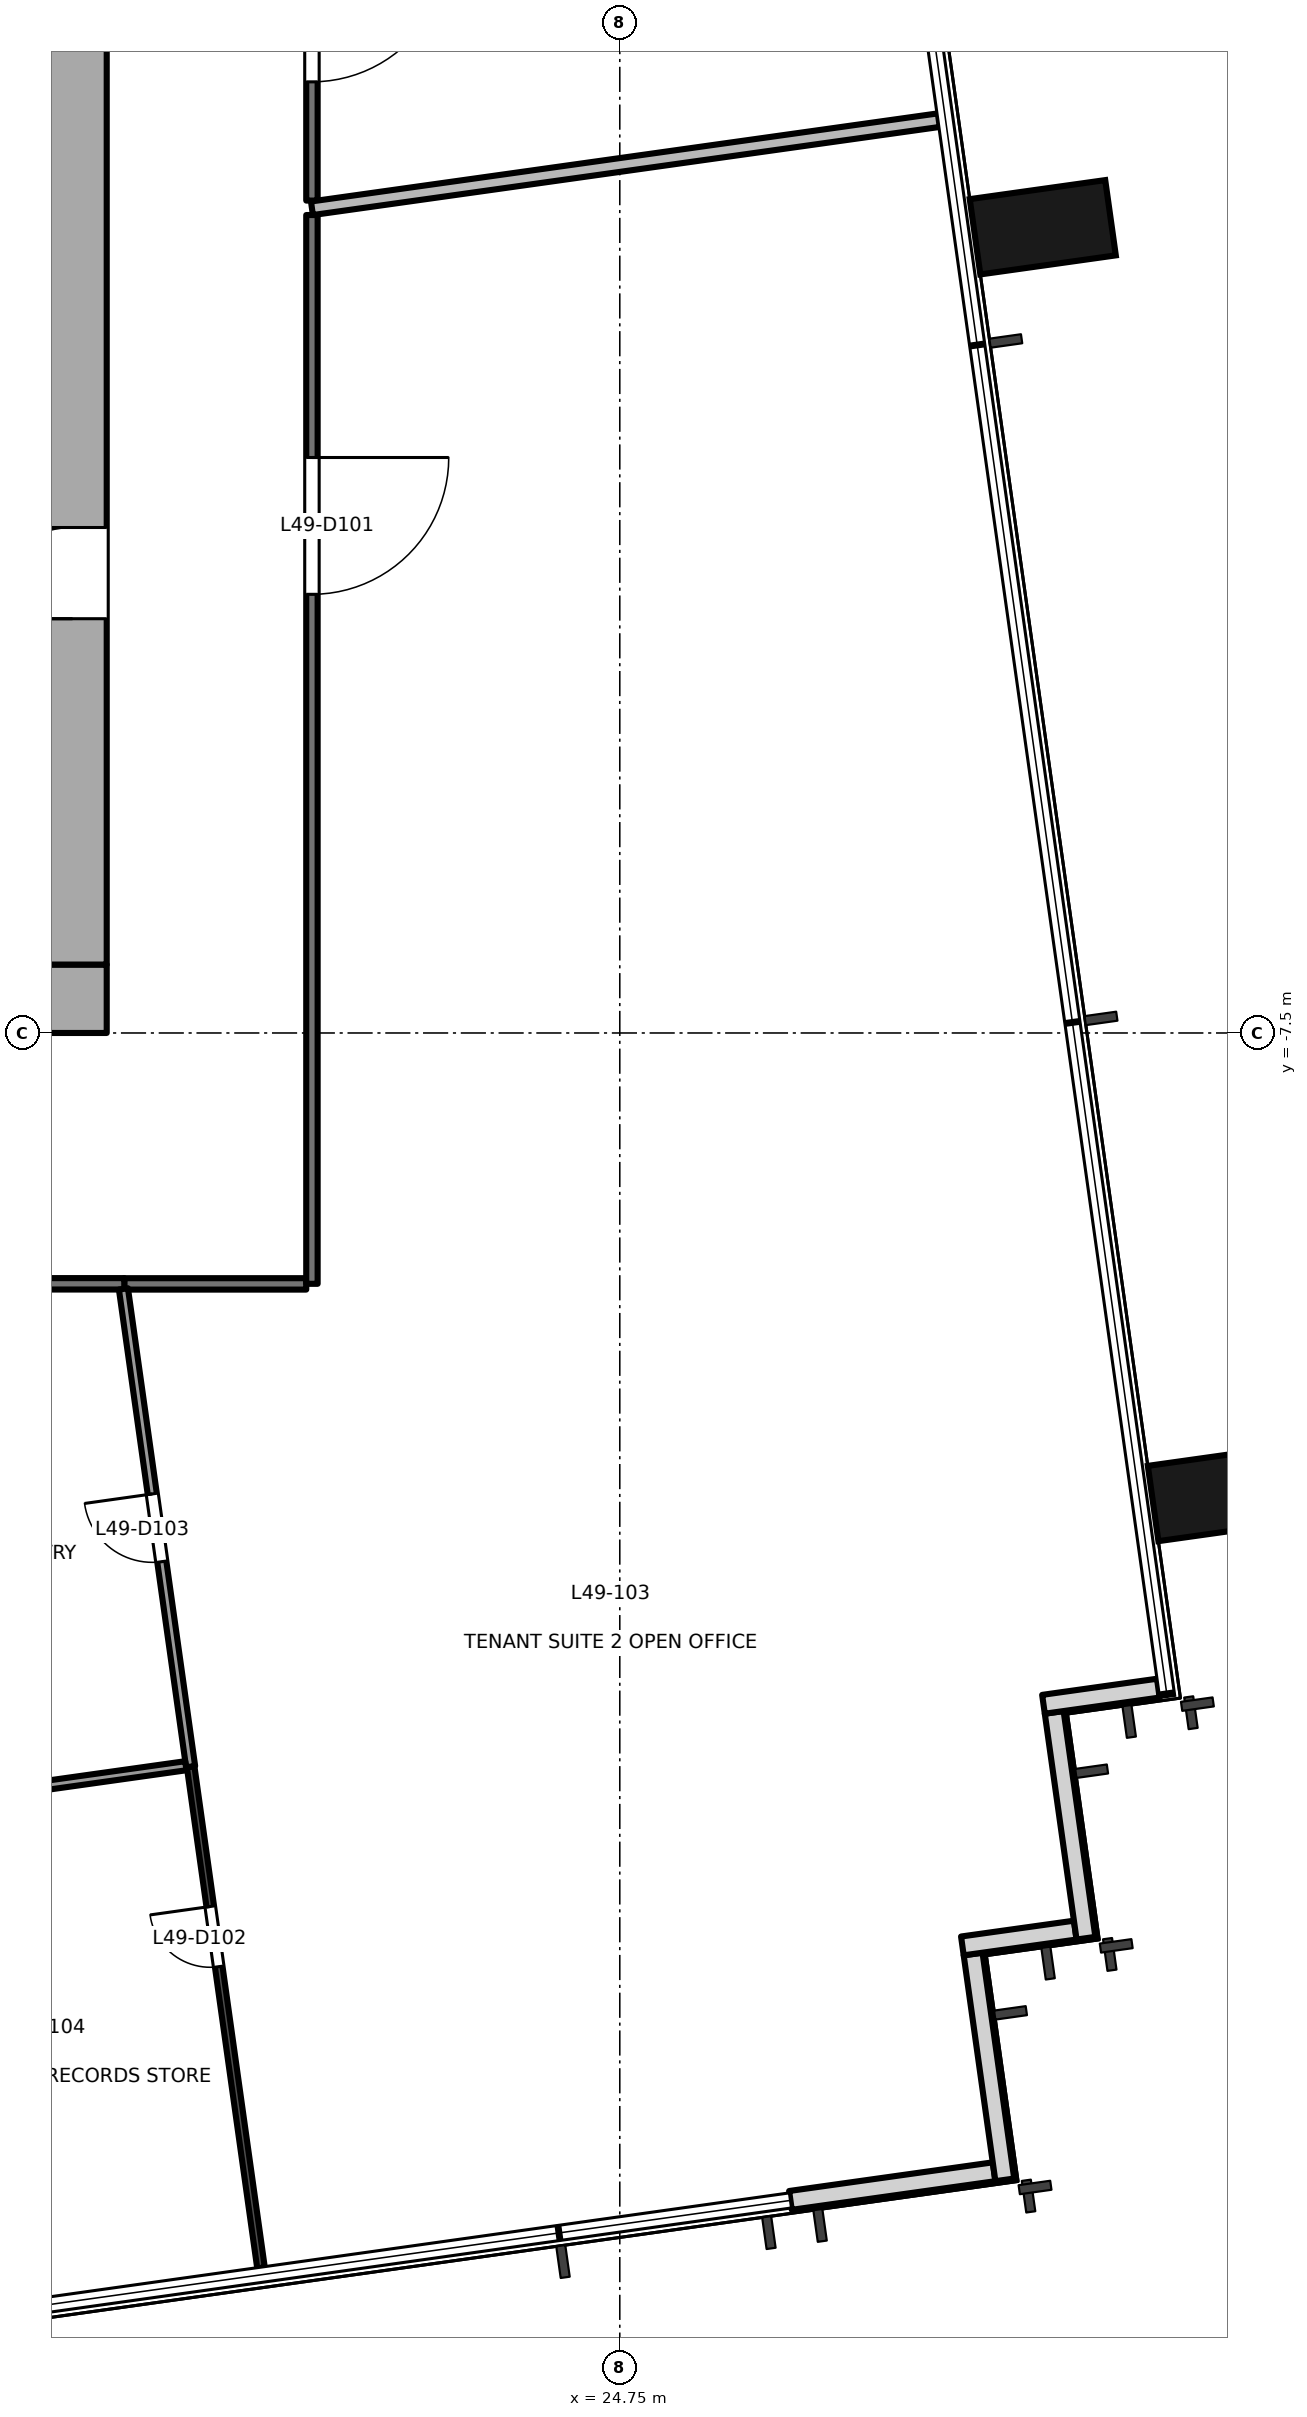
"""IFC4 building model, lengths in metres.
Left out: names, types, materials, properties, quantities, classifications, styles, units other than length and angle.
Written with IfcOpenShell. Run it as: python <this file> out.ifc"""

import sys

from ifc_helpers import new_model, si_unit, direction, frame, frame_2d, origin, origin_2d, place, context, subcontext, project, spatial, rectangle, extrude, element, fill, save


model = new_model("IFC4")
c1 = context("Model", 3, precision=1e-05, world=origin(), true_north=direction((0.0, 1.0)))
c2 = subcontext(c1, "Body", "Model", "MODEL_VIEW")
j1 = project(units=[si_unit("LENGTHUNIT", "METRE"), si_unit("PLANEANGLEUNIT", "RADIAN")], contexts=[c1])
p1 = place(None, origin())
s1 = spatial("IfcSite", under=j1, at=p1, CompositionType="ELEMENT")
p2 = place(p1, origin())
s2 = spatial("IfcBuilding", under=s1, at=p2, CompositionType="ELEMENT")
p3 = place(p2, frame((0.0, 0.0, 217.4)))
s3 = spatial("IfcBuildingStorey", under=s2, at=p3, CompositionType="ELEMENT", Elevation=217.4)
for number, where, z_axis, x_axis in (
    (1, (32.658, -13.565, -0.2), (0.0, 0.0, 1.0), (-0.139, 0.99, 0.0)),
    (2, (30.315, 3.1, -0.2), (0.0, 0.0, 1.0), (-0.139, 0.99, 0.0)),
):
    element("IfcColumn", number, at=place(p3, frame(where, z_axis=z_axis, x_axis=x_axis)), inside=s3, PredefinedType="COLUMN", context=c2, shape_type="SweptSolid", body=[
        extrude(rectangle(XDim=1.0, YDim=1.8, at=origin_2d()), origin(), (0.0, 0.0, 1.0), 3.9),
    ])
p4 = place(p3, frame((26.995, -22.859, 0.0), z_axis=(0.0, 0.0, 1.0), x_axis=(0.99024510326, 0.139336411139, 0.0)))
e3 = element("IfcWall", 3, at=p4, inside=s3, PredefinedType="SOLIDWALL", context=c2, shape_type="SweptSolid", body=[
    extrude(rectangle(XDim=2.705, YDim=0.25, at=frame_2d((1.353, 0.0))), origin(), (0.0, 0.0, 1.0), 3.7),
])
p5 = place(p3, frame((29.815, -22.588, 0.0), z_axis=(0.0, 0.0, 1.0), x_axis=(-0.138983028379, 0.9902947631, 0.0)))
e4 = element("IfcWall", 4, at=p5, inside=s3, PredefinedType="SOLIDWALL", context=c2, shape_type="SweptSolid", body=[
    extrude(rectangle(XDim=3.0, YDim=0.25, at=frame_2d((1.5, 0.0))), origin(), (0.0, 0.0, 1.0), 3.7),
])
p6 = place(p3, frame((29.257, -19.51, 0.0), z_axis=(0.0, 0.0, 1.0), x_axis=(0.990330117064, 0.138730887823, 0.0)))
e5 = element("IfcWall", 5, at=p6, inside=s3, PredefinedType="SOLIDWALL", context=c2, shape_type="SweptSolid", body=[
    extrude(rectangle(XDim=1.499, YDim=0.25, at=frame_2d((0.75, 0.0))), origin(), (0.0, 0.0, 1.0), 3.7),
])
p7 = place(p3, frame((30.883, -19.409, 0.0), z_axis=(0.0, 0.0, 1.0), x_axis=(-0.139324658755, 0.990246756855, 0.0)))
e6 = element("IfcWall", 6, at=p7, inside=s3, PredefinedType="SOLIDWALL", context=c2, shape_type="SweptSolid", body=[
    extrude(rectangle(XDim=3.0, YDim=0.25, at=frame_2d((1.5, 0.0))), origin(), (0.0, 0.0, 1.0), 3.7),
])
p8 = place(p3, frame((30.324, -16.332, 0.0), z_axis=(0.0, 0.0, 1.0), x_axis=(0.990238641016, 0.139382329723, 0.0)))
e7 = element("IfcWall", 7, at=p8, inside=s3, PredefinedType="SOLIDWALL", context=c2, shape_type="SweptSolid", body=[
    extrude(rectangle(XDim=1.526, YDim=0.25, at=frame_2d((0.763, 0.0))), origin(), (0.0, 0.0, 1.0), 3.7),
])
p9 = place(p3, frame((-18.0, -7.05, -0.2), z_axis=(0.0, 0.0, 1.0), x_axis=(1.0, 0.0, 0.0)))
e8 = element("IfcWall", 8, at=p9, inside=s3, PredefinedType="SHEAR", context=c2, shape_type="SweptSolid", body=[
    extrude(rectangle(XDim=36.0, YDim=0.9, at=frame_2d((18.0, 0.0))), origin(), (0.0, 0.0, 1.0), 3.9),
])
p10 = place(p9, frame((4.9, 0.0, 0.2)))
e9 = element("IfcOpeningElement", 9, at=p10, cuts=e8, PredefinedType="OPENING", context=c2, shape_type="SweptSolid", body=[
    extrude(rectangle(XDim=1.8, YDim=2.1, at=frame_2d((0.9, 1.05))), frame((0.0, 0.46, 0.0), z_axis=(0.0, -1.0, 0.0), x_axis=(1.0, 0.0, 0.0)), (0.0, 0.0, 1.0), 0.921),
])
p11 = place(p9, frame((16.8, 0.0, 0.2)))
e10 = element("IfcOpeningElement", 10, at=p11, cuts=e8, PredefinedType="OPENING", context=c2, shape_type="SweptSolid", body=[
    extrude(rectangle(XDim=2.4, YDim=2.1, at=frame_2d((1.2, 1.05))), frame((0.0, 0.46, 0.0), z_axis=(0.0, -1.0, 0.0), x_axis=(1.0, 0.0, 0.0)), (0.0, 0.0, 1.0), 0.921),
])
p12 = place(p9, frame((26.1, 0.0, 0.2)))
e11 = element("IfcOpeningElement", 11, at=p12, cuts=e8, PredefinedType="OPENING", context=c2, shape_type="SweptSolid", body=[
    extrude(rectangle(XDim=2.4, YDim=2.1, at=frame_2d((1.2, 1.05))), frame((0.0, 0.46, 0.0), z_axis=(0.0, -1.0, 0.0), x_axis=(1.0, 0.0, 0.0)), (0.0, 0.0, 1.0), 0.921),
])
p13 = place(p3, frame((17.55, -6.6, -0.2), z_axis=(0.0, 0.0, 1.0), x_axis=(0.0, 1.0, 0.0)))
e12 = element("IfcWall", 12, at=p13, inside=s3, PredefinedType="SHEAR", context=c2, shape_type="SweptSolid", body=[
    extrude(rectangle(XDim=13.2, YDim=0.9, at=frame_2d((6.6, 0.0))), origin(), (0.0, 0.0, 1.0), 3.9),
])
p14 = place(p13, frame((4.55, 0.0, 0.2)))
e13 = element("IfcOpeningElement", 13, at=p14, cuts=e12, PredefinedType="OPENING", context=c2, shape_type="SweptSolid", body=[
    extrude(rectangle(XDim=1.2, YDim=2.1, at=frame_2d((0.6, 1.05))), frame((0.0, 0.46, 0.0), z_axis=(0.0, -1.0, 0.0), x_axis=(1.0, 0.0, 0.0)), (0.0, 0.0, 1.0), 0.921),
])
p15 = place(p3, frame((20.625, -10.801, 0.0), z_axis=(0.0, 0.0, 1.0), x_axis=(-1.0, 0.0, 0.0)))
e14 = element("IfcWall", 14, at=p15, inside=s3, PredefinedType="PARTITIONING", context=c2, shape_type="SweptSolid", body=[
    extrude(rectangle(XDim=2.394, YDim=0.15, at=frame_2d((1.197, 0.0))), origin(), (0.0, 0.0, 1.0), 3.7),
])
p16 = place(p3, frame((20.7, 3.261, 0.0), z_axis=(0.0, 0.0, 1.0), x_axis=(0.0, -1.0, 0.0)))
e15 = element("IfcWall", 15, at=p16, inside=s3, PredefinedType="PARTITIONING", context=c2, shape_type="SweptSolid", body=[
    extrude(rectangle(XDim=14.061, YDim=0.15, at=frame_2d((7.031, 0.0))), origin(), (0.0, 0.0, 1.0), 3.1),
])
p17 = place(p16, frame((3.19, 0.0, 0.0)))
e16 = element("IfcOpeningElement", 16, at=p17, cuts=e15, PredefinedType="OPENING", context=c2, shape_type="SweptSolid", body=[
    extrude(rectangle(XDim=1.8, YDim=2.1, at=frame_2d((0.9, 1.05))), frame((0.0, 0.085, 0.0), z_axis=(0.0, -1.0, 0.0), x_axis=(1.0, 0.0, 0.0)), (0.0, 0.0, 1.0), 0.171),
])
p18 = place(p3, frame((18.231, -10.8, 0.0), z_axis=(0.0, 0.0, 1.0), x_axis=(-1.0, 0.0, 0.0)))
e17 = element("IfcWall", 17, at=p18, inside=s3, PredefinedType="PARTITIONING", context=c2, shape_type="SweptSolid", body=[
    extrude(rectangle(XDim=4.782, YDim=0.15, at=frame_2d((2.391, 0.0))), origin(), (0.0, 0.0, 1.0), 2.9),
])
p19 = place(p3, frame((20.7, 7.5, 0.0), z_axis=(0.0, 0.0, 1.0), x_axis=(0.0, -1.0, 0.0)))
e18 = element("IfcWall", 18, at=p19, inside=s3, PredefinedType="PARTITIONING", context=c2, shape_type="SweptSolid", body=[
    extrude(rectangle(XDim=4.049, YDim=0.15, at=frame_2d((2.024, 0.0))), origin(), (0.0, 0.0, 1.0), 3.15),
])
p20 = place(p19, frame((0.687, 0.0, 0.0)))
e19 = element("IfcOpeningElement", 19, at=p20, cuts=e18, PredefinedType="OPENING", context=c2, shape_type="SweptSolid", body=[
    extrude(rectangle(XDim=1.8, YDim=2.1, at=frame_2d((0.9, 1.05))), frame((0.0, 0.085, 0.0), z_axis=(0.0, -1.0, 0.0), x_axis=(1.0, 0.0, 0.0)), (0.0, 0.0, 1.0), 0.171),
])
p21 = place(p3, frame((20.03, -23.746, 0.0), z_axis=(0.0, 0.0, 1.0), x_axis=(-0.139070003418, 0.990282552683, 0.0)))
e20 = element("IfcWall", 20, at=p21, inside=s3, PredefinedType="PARTITIONING", context=c2, shape_type="SweptSolid", body=[
    extrude(rectangle(XDim=6.659, YDim=0.1, at=frame_2d((3.329, 0.0))), origin(), (0.0, 0.0, 1.0), 3.7),
])
p22 = place(p21, frame((4.001, 0.0, 0.0)))
e21 = element("IfcOpeningElement", 21, at=p22, cuts=e20, PredefinedType="OPENING", context=c2, shape_type="SweptSolid", body=[
    extrude(rectangle(XDim=0.8, YDim=2.1, at=frame_2d((0.4, 1.05))), frame((0.0, 0.061, 0.0), z_axis=(0.0, -1.0, 0.0), x_axis=(1.0, 0.0, 0.0)), (0.0, 0.0, 1.0), 0.121),
])
p23 = place(p3, frame((19.104, -17.152, 0.0), z_axis=(0.0, 0.0, 1.0), x_axis=(-0.139283120935, 0.99025260021, 0.0)))
e22 = element("IfcWall", 22, at=p23, inside=s3, PredefinedType="PARTITIONING", context=c2, shape_type="SweptSolid", body=[
    extrude(rectangle(XDim=6.347, YDim=0.12, at=frame_2d((3.173, 0.0))), origin(), (0.0, 0.0, 1.0), 3.7),
])
p24 = place(p23, frame((2.723, 0.0, 0.0)))
e23 = element("IfcOpeningElement", 23, at=p24, cuts=e22, PredefinedType="OPENING", context=c2, shape_type="SweptSolid", body=[
    extrude(rectangle(XDim=0.9, YDim=2.1, at=frame_2d((0.45, 1.05))), frame((0.0, 0.071, 0.0), z_axis=(0.0, -1.0, 0.0), x_axis=(1.0, 0.0, 0.0)), (0.0, 0.0, 1.0), 0.141),
])
p25 = place(p3, frame((20.7, 3.35, 0.0), z_axis=(0.0, 0.0, 1.0), x_axis=(0.990269965101, 0.139159606996, 0.0)))
e24 = element("IfcWall", 24, at=p25, inside=s3, PredefinedType="PARTITIONING", context=c2, shape_type="SweptSolid", body=[
    extrude(rectangle(XDim=8.328, YDim=0.18, at=frame_2d((4.164, 0.0))), origin(), (0.0, 0.0, 1.0), 3.15),
])
p26 = place(p3, frame((14.421, -17.79, 0.0), z_axis=(0.0, 0.0, 1.0), x_axis=(0.990243495755, 0.139347834982, 0.0)))
e25 = element("IfcWall", 25, at=p26, inside=s3, PredefinedType="PARTITIONING", context=c2, shape_type="SweptSolid", body=[
    extrude(rectangle(XDim=4.666, YDim=0.12, at=frame_2d((2.333, 0.0))), origin(), (0.0, 0.0, 1.0), 3.7),
])
p27 = place(p14, origin())
e26 = element("IfcDoor", 26, at=p27, inside=s3, OperationType="SINGLE_SWING_LEFT", PredefinedType="DOOR", context=c2, shape_type="SweptSolid", body=[
    extrude(rectangle(XDim=1.2, YDim=2.1, at=frame_2d((0.6, 1.05))), frame((0.0, 0.025, 0.0), z_axis=(0.0, -1.0, 0.0), x_axis=(1.0, 0.0, 0.0)), (0.0, 0.0, 1.0), 0.05),
])
fill(e13, e26)
p28 = place(p17, origin())
e27 = element("IfcDoor", 27, at=p28, inside=s3, OperationType="DOUBLE_DOOR_SINGLE_SWING", PredefinedType="DOOR", context=c2, shape_type="SweptSolid", body=[
    extrude(rectangle(XDim=1.8, YDim=2.1, at=frame_2d((0.9, 1.05))), frame((0.0, 0.025, 0.0), z_axis=(0.0, -1.0, 0.0), x_axis=(1.0, 0.0, 0.0)), (0.0, 0.0, 1.0), 0.05),
])
fill(e16, e27)
p29 = place(p22, origin())
e28 = element("IfcDoor", 28, at=p29, inside=s3, OperationType="SINGLE_SWING_RIGHT", PredefinedType="DOOR", context=c2, shape_type="SweptSolid", body=[
    extrude(rectangle(XDim=0.8, YDim=2.1, at=frame_2d((0.4, 1.05))), frame((0.0, 0.025, 0.0), z_axis=(0.0, -1.0, 0.0), x_axis=(1.0, 0.0, 0.0)), (0.0, 0.0, 1.0), 0.05),
])
fill(e21, e28)
p30 = place(p24, origin())
e29 = element("IfcDoor", 29, at=p30, inside=s3, OperationType="SINGLE_SWING_RIGHT", PredefinedType="DOOR", context=c2, shape_type="SweptSolid", body=[
    extrude(rectangle(XDim=0.9, YDim=2.1, at=frame_2d((0.45, 1.05))), frame((0.0, 0.025, 0.0), z_axis=(0.0, -1.0, 0.0), x_axis=(1.0, 0.0, 0.0)), (0.0, 0.0, 1.0), 0.05),
])
fill(e23, e29)
p31 = place(p20, origin())
e30 = element("IfcDoor", 30, at=p31, inside=s3, OperationType="DOUBLE_DOOR_SINGLE_SWING", PredefinedType="DOOR", context=c2, shape_type="SweptSolid", body=[
    extrude(rectangle(XDim=1.8, YDim=2.1, at=frame_2d((0.9, 1.05))), frame((0.0, 0.025, 0.0), z_axis=(0.0, -1.0, 0.0), x_axis=(1.0, 0.0, 0.0)), (0.0, 0.0, 1.0), 0.05),
])
fill(e19, e30)
save(model, sys.argv[1])
